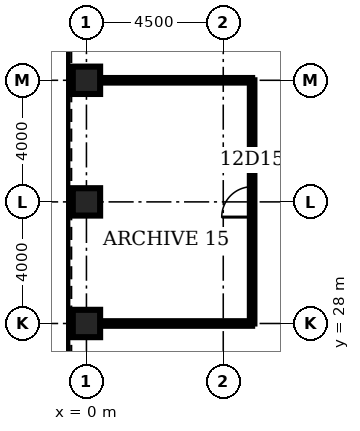
"""IFC4 building model, lengths in metres.
Left out: names, types, materials, properties, quantities, classifications, styles, units other than length and angle.
Written with IfcOpenShell. Run it as: python <this file> out.ifc"""

import sys

from ifc_helpers import new_model, si_unit, direction, frame, frame_2d, origin, origin_2d, place, context, subcontext, project, spatial, rectangle, hollow_rectangle, extrude, element, fill, save


model = new_model("IFC4")
c1 = context("Model", 3, precision=1e-05, world=origin(), true_north=direction((0.0, 1.0)))
c2 = subcontext(c1, "Body", "Model", "MODEL_VIEW")
j1 = project(units=[si_unit("LENGTHUNIT", "METRE"), si_unit("PLANEANGLEUNIT", "RADIAN")], contexts=[c1])
p1 = place(None, origin())
s1 = spatial("IfcSite", under=j1, at=p1, CompositionType="ELEMENT")
p2 = place(p1, origin())
s2 = spatial("IfcBuilding", under=s1, at=p2, CompositionType="ELEMENT")
p3 = place(p2, frame((0.0, 0.0, 59.0)))
s3 = spatial("IfcBuildingStorey", under=s2, at=p3, CompositionType="ELEMENT", Elevation=59.0)
for number, where, z_axis, x_axis in (
    (1, (0.0, 36.0, 0.0), (0.0, 0.0, 1.0), (1.0, 0.0, 0.0)),
    (2, (0.0, 32.0, 0.0), (0.0, 0.0, 1.0), (1.0, 0.0, 0.0)),
    (3, (0.0, 28.0, 0.0), (0.0, 0.0, 1.0), (1.0, 0.0, 0.0)),
):
    element("IfcColumn", number, at=place(p3, frame(where, z_axis=z_axis, x_axis=x_axis)), inside=s3, PredefinedType="COLUMN", context=c2, shape_type="SweptSolid", body=[
        extrude(hollow_rectangle(XDim=0.9, YDim=0.9, WallThickness=0.12, at=origin_2d()), origin(), (0.0, 0.0, 1.0), 4.5),
    ])
for number, where, z_axis, x_axis in (
    (4, (0.45, 28.0, 0.0), (0.0, 0.0, 1.0), (1.0, 0.0, 0.0)),
    (5, (0.45, 36.0, 0.0), (0.0, 0.0, 1.0), (1.0, 0.0, 0.0)),
):
    element("IfcWall", number, at=place(p3, frame(where, z_axis=z_axis, x_axis=x_axis)), inside=s3, PredefinedType="PARTITIONING", context=c2, shape_type="SweptSolid", body=[
        extrude(rectangle(XDim=5.0, YDim=0.15, at=frame_2d((2.5, 0.0))), origin(), (0.0, 0.0, 1.0), 3.0),
    ])
p4 = place(p3, frame((5.45, 28.0, 0.0), z_axis=(0.0, 0.0, 1.0), x_axis=(0.0, 1.0, 0.0)))
e6 = element("IfcWall", 6, at=p4, inside=s3, PredefinedType="PARTITIONING", context=c2, shape_type="SweptSolid", body=[
    extrude(rectangle(XDim=8.0, YDim=0.15, at=frame_2d((4.0, 0.0))), origin(), (0.0, 0.0, 1.0), 3.0),
])
p5 = place(p4, frame((3.5, 0.0, 0.0)))
e7 = element("IfcOpeningElement", 7, at=p5, cuts=e6, PredefinedType="OPENING", context=c2, shape_type="SweptSolid", body=[
    extrude(rectangle(XDim=1.0, YDim=2.1, at=frame_2d((0.5, 1.05))), frame((0.0, 0.085, 0.0), z_axis=(0.0, -1.0, 0.0), x_axis=(1.0, 0.0, 0.0)), (0.0, 0.0, 1.0), 0.17),
])
p6 = place(p5, origin())
e8 = element("IfcDoor", 8, at=p6, inside=s3, OperationType="SINGLE_SWING_LEFT", PredefinedType="DOOR", context=c2, shape_type="SweptSolid", body=[
    extrude(rectangle(XDim=1.0, YDim=2.1, at=frame_2d((0.5, 1.05))), frame((0.0, 0.025, 0.0), z_axis=(0.0, -1.0, 0.0), x_axis=(1.0, 0.0, 0.0)), (0.0, 0.0, 1.0), 0.05),
])
fill(e7, e8)
save(model, sys.argv[1])
